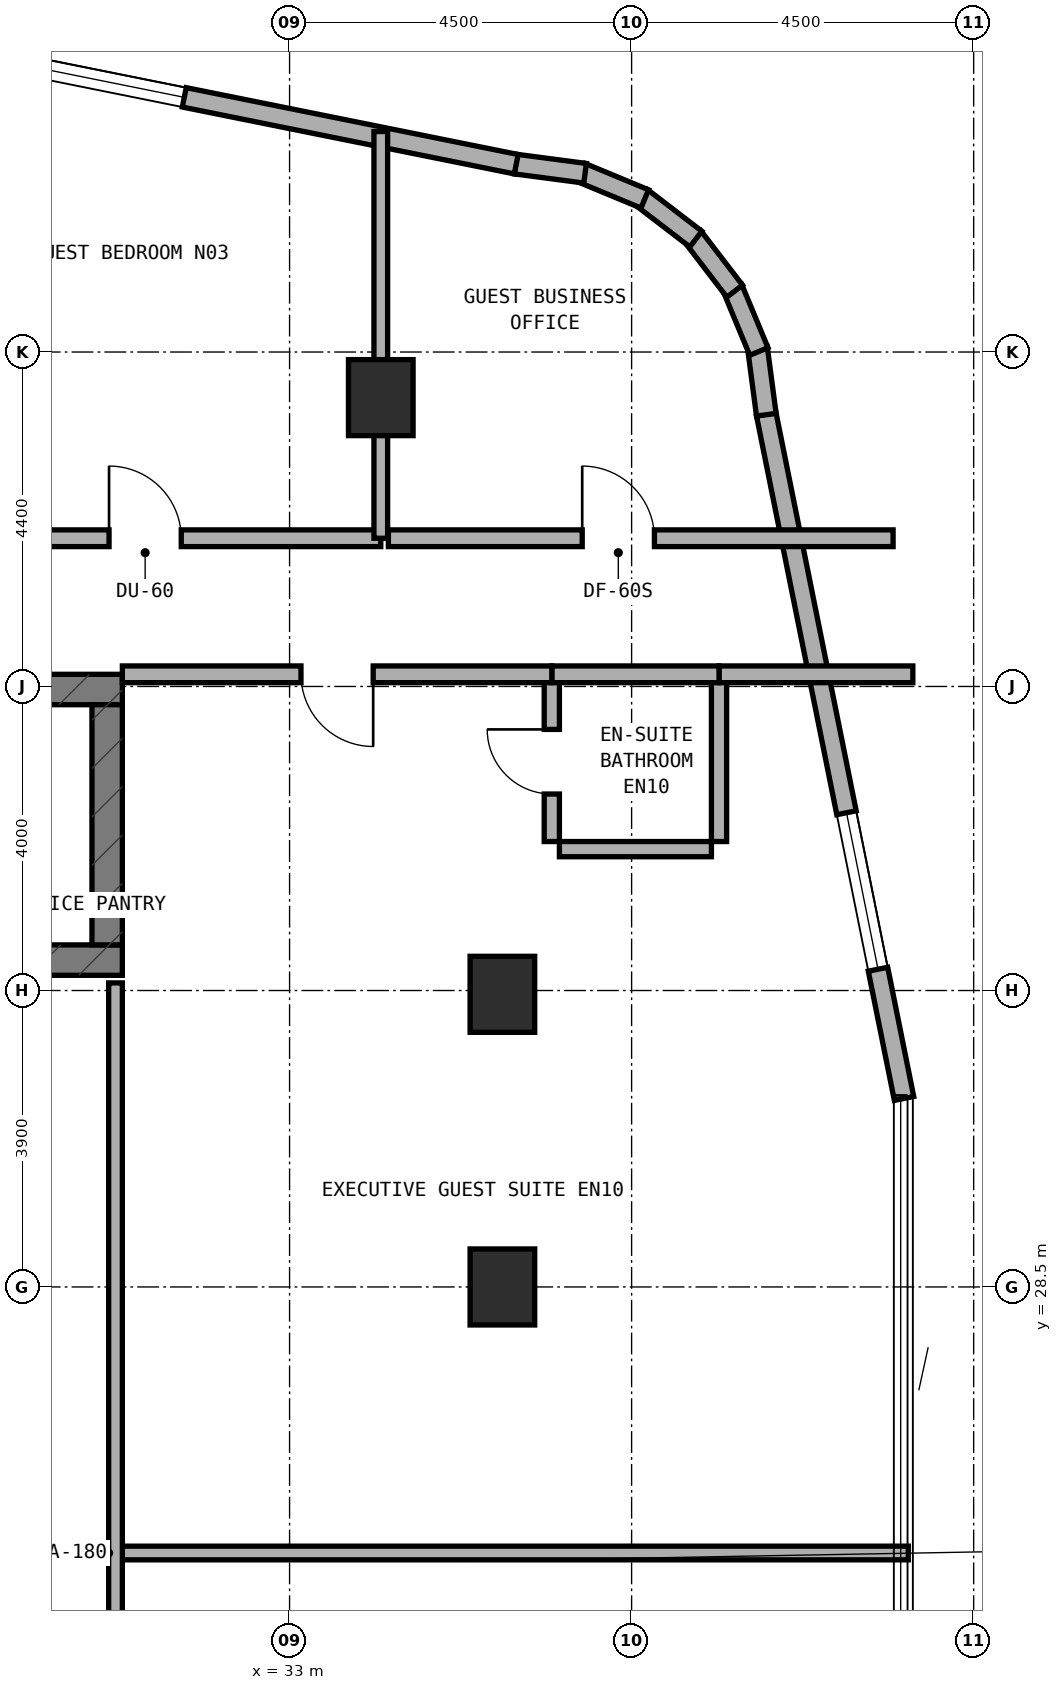
"""IFC4 building model, lengths in metres.
Left out: names, types, materials, properties, quantities, classifications, styles, units other than length and angle.
Written with IfcOpenShell. Run it as: python <this file> out.ifc"""

import sys

from ifc_helpers import new_model, si_unit, direction, frame, frame_2d, origin, origin_2d, place, context, subcontext, project, spatial, rectangle, extrude, element, fill, save


model = new_model("IFC4")
c1 = context("Model", 3, precision=1e-05, world=origin(), true_north=direction((0.0, 1.0)))
c2 = subcontext(c1, "Body", "Model", "MODEL_VIEW")
j1 = project(units=[si_unit("LENGTHUNIT", "METRE"), si_unit("PLANEANGLEUNIT", "RADIAN")], contexts=[c1])
p1 = place(None, origin())
s1 = spatial("IfcSite", under=j1, at=p1, CompositionType="ELEMENT")
p2 = place(p1, origin())
s2 = spatial("IfcBuilding", under=s1, at=p2, CompositionType="ELEMENT")
p3 = place(p2, frame((0.0, 0.0, 134.5)))
s3 = spatial("IfcBuildingStorey", under=s2, at=p3, CompositionType="ELEMENT", Elevation=134.5)
p4 = place(p3, frame((6.4, 32.8, 0.0), z_axis=(0.0, 0.0, 1.0), x_axis=(1.0, 0.0, 0.0)))
e1 = element("IfcWall", 1, at=p4, inside=s3, PredefinedType="SHEAR", context=c2, shape_type="SweptSolid", body=[
    extrude(rectangle(XDim=24.4, YDim=0.4, at=frame_2d((12.2, 0.0))), origin(), (0.0, 0.0, 1.0), 3.5),
])
p5 = place(p4, frame((6.05, 0.0, 0.0)))
e2 = element("IfcOpeningElement", 2, at=p5, cuts=e1, PredefinedType="OPENING", context=c2, shape_type="SweptSolid", body=[
    extrude(rectangle(XDim=1.1, YDim=2.15, at=frame_2d((0.55, 1.075))), frame((0.0, 0.21, 0.0), z_axis=(0.0, -1.0, 0.0), x_axis=(1.0, 0.0, 0.0)), (0.0, 0.0, 1.0), 0.42),
])
p6 = place(p3, frame((6.4, 36.36, 0.0), z_axis=(0.0, 0.0, 1.0), x_axis=(1.0, 0.0, 0.0)))
e3 = element("IfcWall", 3, at=p6, inside=s3, PredefinedType="SHEAR", context=c2, shape_type="SweptSolid", body=[
    extrude(rectangle(XDim=24.4, YDim=0.4, at=frame_2d((12.2, 0.0))), origin(), (0.0, 0.0, 1.0), 3.5),
])
p7 = place(p6, frame((9.15, 0.0, 0.0)))
e4 = element("IfcOpeningElement", 4, at=p7, cuts=e3, PredefinedType="OPENING", context=c2, shape_type="SweptSolid", body=[
    extrude(rectangle(XDim=1.2, YDim=2.15, at=frame_2d((0.6, 1.075))), frame((0.0, 0.21, 0.0), z_axis=(0.0, -1.0, 0.0), x_axis=(1.0, 0.0, 0.0)), (0.0, 0.0, 1.0), 0.42),
])
p8 = place(p6, frame((19.2, 0.0, 0.0)))
e5 = element("IfcOpeningElement", 5, at=p8, cuts=e3, PredefinedType="OPENING", context=c2, shape_type="SweptSolid", body=[
    extrude(rectangle(XDim=0.85, YDim=2.1, at=frame_2d((0.425, 1.05))), frame((0.0, 0.21, 0.0), z_axis=(0.0, -1.0, 0.0), x_axis=(1.0, 0.0, 0.0)), (0.0, 0.0, 1.0), 0.42),
])
p9 = place(p6, frame((16.94, 0.0, 0.0)))
e6 = element("IfcOpeningElement", 6, at=p9, cuts=e3, PredefinedType="OPENING", context=c2, shape_type="SweptSolid", body=[
    extrude(rectangle(XDim=0.85, YDim=2.1, at=frame_2d((0.425, 1.05))), frame((0.0, 0.21, 0.0), z_axis=(0.0, -1.0, 0.0), x_axis=(1.0, 0.0, 0.0)), (0.0, 0.0, 1.0), 0.42),
])
p10 = place(p3, frame((30.6, 33.0, 0.0), z_axis=(0.0, 0.0, 1.0), x_axis=(0.0, 1.0, 0.0)))
e7 = element("IfcWall", 7, at=p10, inside=s3, PredefinedType="SHEAR", context=c2, shape_type="SweptSolid", body=[
    extrude(rectangle(XDim=3.16, YDim=0.4, at=frame_2d((1.58, 0.0))), origin(), (0.0, 0.0, 1.0), 3.5),
])
for number, where, z_axis, x_axis in (
    (8, (34.2, 40.2, 0.0), (0.0, 0.0, 1.0), (1.0, 0.0, 0.0)),
    (9, (35.8, 28.5, 0.0), (0.0, 0.0, 1.0), (1.0, 0.0, 0.0)),
    (10, (35.8, 32.35, 0.0), (0.0, 0.0, 1.0), (1.0, 0.0, 0.0)),
):
    element("IfcColumn", number, at=place(p3, frame(where, z_axis=z_axis, x_axis=x_axis)), inside=s3, PredefinedType="COLUMN", context=c2, shape_type="SweptSolid", body=[
        extrude(rectangle(XDim=0.85, YDim=1.0, at=origin_2d()), origin(), (0.0, 0.0, 1.0), 3.5),
    ])
p11 = place(p3, frame((41.084, 30.98, 0.0), z_axis=(0.0, 0.0, 1.0), x_axis=(-0.197435082048, 0.980315963543, 0.0)))
e11 = element("IfcWall", 11, at=p11, inside=s3, PredefinedType="STANDARD", context=c2, shape_type="SweptSolid", body=[
    extrude(rectangle(XDim=9.183, YDim=0.26, at=frame_2d((4.591, 0.0))), origin(), (0.0, 0.0, 1.0), 3.22),
])
p12 = place(p11, frame((1.734, 0.0, 0.85)))
e12 = element("IfcOpeningElement", 12, at=p12, cuts=e11, PredefinedType="OPENING", context=c2, shape_type="SweptSolid", body=[
    extrude(rectangle(XDim=2.1, YDim=1.5, at=frame_2d((1.05, 0.75))), frame((0.0, 0.14, 0.0), z_axis=(0.0, -1.0, 0.0), x_axis=(1.0, 0.0, 0.0)), (0.0, 0.0, 1.0), 0.28),
])
p13 = place(p3, frame((39.272, 39.975, 0.0), z_axis=(0.0, 0.0, 1.0), x_axis=(-0.130953706898, 0.991388484223, 0.0)))
e13 = element("IfcWall", 13, at=p13, inside=s3, PredefinedType="STANDARD", context=c2, shape_type="SweptSolid", body=[
    extrude(rectangle(XDim=0.885, YDim=0.26, at=frame_2d((0.443, 0.0))), origin(), (0.0, 0.0, 1.0), 3.22),
])
p14 = place(p3, frame((39.174, 40.807, 0.0), z_axis=(0.0, 0.0, 1.0), x_axis=(-0.383290660547, 0.923627776508, 0.0)))
e14 = element("IfcWall", 14, at=p14, inside=s3, PredefinedType="STANDARD", context=c2, shape_type="SweptSolid", body=[
    extrude(rectangle(XDim=0.903, YDim=0.26, at=frame_2d((0.452, 0.0))), origin(), (0.0, 0.0, 1.0), 3.22),
])
p15 = place(p3, frame((38.856, 41.601, 0.0), z_axis=(0.0, 0.0, 1.0), x_axis=(-0.608624690463, 0.793458244748, 0.0)))
e15 = element("IfcWall", 15, at=p15, inside=s3, PredefinedType="STANDARD", context=c2, shape_type="SweptSolid", body=[
    extrude(rectangle(XDim=0.902, YDim=0.26, at=frame_2d((0.451, 0.0))), origin(), (0.0, 0.0, 1.0), 3.22),
])
p16 = place(p3, frame((38.345, 42.286, 0.0), z_axis=(0.0, 0.0, 1.0), x_axis=(-0.793558456666, 0.608494022858, 0.0)))
e16 = element("IfcWall", 16, at=p16, inside=s3, PredefinedType="STANDARD", context=c2, shape_type="SweptSolid", body=[
    extrude(rectangle(XDim=0.902, YDim=0.26, at=frame_2d((0.451, 0.0))), origin(), (0.0, 0.0, 1.0), 3.22),
])
p17 = place(p3, frame((37.673, 42.814, 0.0), z_axis=(0.0, 0.0, 1.0), x_axis=(-0.923683767999, 0.383155708213, 0.0)))
e17 = element("IfcWall", 17, at=p17, inside=s3, PredefinedType="STANDARD", context=c2, shape_type="SweptSolid", body=[
    extrude(rectangle(XDim=0.903, YDim=0.26, at=frame_2d((0.451, 0.0))), origin(), (0.0, 0.0, 1.0), 3.22),
])
p18 = place(p3, frame((36.888, 43.152, 0.0), z_axis=(0.0, 0.0, 1.0), x_axis=(-0.991487658083, 0.130200706103, 0.0)))
e18 = element("IfcWall", 18, at=p18, inside=s3, PredefinedType="STANDARD", context=c2, shape_type="SweptSolid", body=[
    extrude(rectangle(XDim=0.921, YDim=0.26, at=frame_2d((0.46, 0.0))), origin(), (0.0, 0.0, 1.0), 3.22),
])
p19 = place(p3, frame((35.982, 43.271, 0.0), z_axis=(0.0, 0.0, 1.0), x_axis=(-0.980317172899, 0.197429077186, 0.0)))
e19 = element("IfcWall", 19, at=p19, inside=s3, PredefinedType="STANDARD", context=c2, shape_type="SweptSolid", body=[
    extrude(rectangle(XDim=9.117, YDim=0.26, at=frame_2d((4.559, 0.0))), origin(), (0.0, 0.0, 1.0), 3.22),
])
p20 = place(p19, frame((4.455, 0.0, 0.85)))
e20 = element("IfcOpeningElement", 20, at=p20, cuts=e19, PredefinedType="OPENING", context=c2, shape_type="SweptSolid", body=[
    extrude(rectangle(XDim=2.1, YDim=1.5, at=frame_2d((1.05, 0.75))), frame((0.0, 0.14, 0.0), z_axis=(0.0, -1.0, 0.0), x_axis=(1.0, 0.0, 0.0)), (0.0, 0.0, 1.0), 0.28),
])
p21 = place(p3, frame((28.0, 38.35, 0.0), z_axis=(0.0, 0.0, 1.0), x_axis=(1.0, 0.0, 0.0)))
e21 = element("IfcWall", 21, at=p21, inside=s3, PredefinedType="SOLIDWALL", context=c2, shape_type="SweptSolid", body=[
    extrude(rectangle(XDim=6.2, YDim=0.22, at=frame_2d((3.1, 0.0))), origin(), (0.0, 0.0, 1.0), 2.695),
])
p22 = place(p21, frame((2.625, 0.0, 0.0)))
e22 = element("IfcOpeningElement", 22, at=p22, cuts=e21, PredefinedType="OPENING", context=c2, shape_type="SweptSolid", body=[
    extrude(rectangle(XDim=0.95, YDim=2.1, at=frame_2d((0.475, 1.05))), frame((0.0, 0.12, 0.0), z_axis=(0.0, -1.0, 0.0), x_axis=(1.0, 0.0, 0.0)), (0.0, 0.0, 1.0), 0.24),
])
p23 = place(p3, frame((34.2, 38.35, 0.0), z_axis=(0.0, 0.0, 1.0), x_axis=(0.0, 1.0, 0.0)))
e23 = element("IfcWall", 23, at=p23, inside=s3, PredefinedType="SOLIDWALL", context=c2, shape_type="SweptSolid", body=[
    extrude(rectangle(XDim=5.351, YDim=0.18, at=frame_2d((2.675, 0.0))), origin(), (0.0, 0.0, 1.0), 2.695),
])
p24 = place(p3, frame((34.3, 38.35, 0.0), z_axis=(0.0, 0.0, 1.0), x_axis=(1.0, 0.0, 0.0)))
e24 = element("IfcWall", 24, at=p24, inside=s3, PredefinedType="SOLIDWALL", context=c2, shape_type="SweptSolid", body=[
    extrude(rectangle(XDim=6.64, YDim=0.22, at=frame_2d((3.32, 0.0))), origin(), (0.0, 0.0, 1.0), 2.835),
])
p25 = place(p24, frame((2.55, 0.0, 0.0)))
e25 = element("IfcOpeningElement", 25, at=p25, cuts=e24, PredefinedType="OPENING", context=c2, shape_type="SweptSolid", body=[
    extrude(rectangle(XDim=0.95, YDim=2.1, at=frame_2d((0.475, 1.05))), frame((0.0, 0.12, 0.0), z_axis=(0.0, -1.0, 0.0), x_axis=(1.0, 0.0, 0.0)), (0.0, 0.0, 1.0), 0.24),
])
p26 = place(p3, frame((30.8, 25.0, 0.0), z_axis=(0.0, 0.0, 1.0), x_axis=(1.0, 0.0, 0.0)))
e26 = element("IfcWall", 26, at=p26, inside=s3, PredefinedType="SOLIDWALL", context=c2, shape_type="SweptSolid", body=[
    extrude(rectangle(XDim=10.34, YDim=0.18, at=frame_2d((5.17, 0.0))), origin(), (0.0, 0.0, 1.0), 2.835),
])
p27 = place(p3, frame((30.71, 17.5, 0.0), z_axis=(0.0, 0.0, 1.0), x_axis=(0.0, 1.0, 0.0)))
e27 = element("IfcWall", 27, at=p27, inside=s3, PredefinedType="SOLIDWALL", context=c2, shape_type="SweptSolid", body=[
    extrude(rectangle(XDim=15.0, YDim=0.18, at=frame_2d((7.5, 0.0))), origin(), (0.0, 0.0, 1.0), 2.695),
])
p28 = place(p3, frame((36.45, 34.36, 0.0), z_axis=(0.0, 0.0, 1.0), x_axis=(0.0, 1.0, 0.0)))
e28 = element("IfcWall", 28, at=p28, inside=s3, PredefinedType="PLUMBINGWALL", context=c2, shape_type="SweptSolid", body=[
    extrude(rectangle(XDim=2.1, YDim=0.2, at=frame_2d((1.05, 0.0))), origin(), (0.0, 0.0, 1.0), 3.22),
])
p29 = place(p28, frame((0.625, 0.0, 0.0)))
e29 = element("IfcOpeningElement", 29, at=p29, cuts=e28, PredefinedType="OPENING", context=c2, shape_type="SweptSolid", body=[
    extrude(rectangle(XDim=0.85, YDim=2.1, at=frame_2d((0.425, 1.05))), frame((0.0, 0.11, 0.0), z_axis=(0.0, -1.0, 0.0), x_axis=(1.0, 0.0, 0.0)), (0.0, 0.0, 1.0), 0.22),
])
p30 = place(p3, frame((36.55, 34.26, 0.0), z_axis=(0.0, 0.0, 1.0), x_axis=(1.0, 0.0, 0.0)))
e30 = element("IfcWall", 30, at=p30, inside=s3, PredefinedType="PLUMBINGWALL", context=c2, shape_type="SweptSolid", body=[
    extrude(rectangle(XDim=2.0, YDim=0.2, at=frame_2d((1.0, 0.0))), origin(), (0.0, 0.0, 1.0), 3.22),
])
p31 = place(p3, frame((38.65, 34.36, 0.0), z_axis=(0.0, 0.0, 1.0), x_axis=(0.0, 1.0, 0.0)))
e31 = element("IfcWall", 31, at=p31, inside=s3, PredefinedType="PLUMBINGWALL", context=c2, shape_type="SweptSolid", body=[
    extrude(rectangle(XDim=2.1, YDim=0.2, at=frame_2d((1.05, 0.0))), origin(), (0.0, 0.0, 1.0), 3.22),
])
p32 = place(p3, frame((38.65, 36.56, 0.0), z_axis=(0.0, 0.0, 1.0), x_axis=(1.0, 0.0, 0.0)))
e32 = element("IfcWall", 32, at=p32, inside=s3, PredefinedType="SOLIDWALL", context=c2, shape_type="SweptSolid", body=[
    extrude(rectangle(XDim=2.55, YDim=0.22, at=frame_2d((1.275, 0.0))), origin(), (0.0, 0.0, 1.0), 3.22),
])
p33 = place(p3, frame((36.45, 36.56, 0.0), z_axis=(0.0, 0.0, 1.0), x_axis=(1.0, 0.0, 0.0)))
e33 = element("IfcWall", 33, at=p33, inside=s3, PredefinedType="SOLIDWALL", context=c2, shape_type="SweptSolid", body=[
    extrude(rectangle(XDim=2.2, YDim=0.22, at=frame_2d((1.1, 0.0))), origin(), (0.0, 0.0, 1.0), 3.22),
])
p34 = place(p3, frame((30.8, 36.56, 0.0), z_axis=(0.0, 0.0, 1.0), x_axis=(1.0, 0.0, 0.0)))
e34 = element("IfcWall", 34, at=p34, inside=s3, PredefinedType="SOLIDWALL", context=c2, shape_type="SweptSolid", body=[
    extrude(rectangle(XDim=5.65, YDim=0.22, at=frame_2d((2.825, 0.0))), origin(), (0.0, 0.0, 1.0), 2.695),
])
p35 = place(p34, frame((2.35, 0.0, 0.0)))
e35 = element("IfcOpeningElement", 35, at=p35, cuts=e34, PredefinedType="OPENING", context=c2, shape_type="SweptSolid", body=[
    extrude(rectangle(XDim=0.95, YDim=2.1, at=frame_2d((0.475, 1.05))), frame((0.0, 0.12, 0.0), z_axis=(0.0, -1.0, 0.0), x_axis=(1.0, 0.0, 0.0)), (0.0, 0.0, 1.0), 0.24),
])
p36 = place(p12, origin())
e36 = element("IfcWindow", 36, at=p36, inside=s3, PartitioningType="SINGLE_PANEL", PredefinedType="WINDOW", context=c2, shape_type="SweptSolid", body=[
    extrude(rectangle(XDim=2.1, YDim=1.5, at=frame_2d((1.05, 0.75))), frame((0.0, 0.03, 0.0), z_axis=(0.0, -1.0, 0.0), x_axis=(1.0, 0.0, 0.0)), (0.0, 0.0, 1.0), 0.06),
])
fill(e12, e36)
p37 = place(p20, origin())
e37 = element("IfcWindow", 37, at=p37, inside=s3, PartitioningType="SINGLE_PANEL", PredefinedType="WINDOW", context=c2, shape_type="SweptSolid", body=[
    extrude(rectangle(XDim=2.1, YDim=1.5, at=frame_2d((1.05, 0.75))), frame((0.0, 0.03, 0.0), z_axis=(0.0, -1.0, 0.0), x_axis=(1.0, 0.0, 0.0)), (0.0, 0.0, 1.0), 0.06),
])
fill(e20, e37)
p38 = place(p22, origin())
e38 = element("IfcDoor", 38, at=p38, inside=s3, OperationType="SINGLE_SWING_LEFT", PredefinedType="DOOR", context=c2, shape_type="SweptSolid", body=[
    extrude(rectangle(XDim=0.95, YDim=2.1, at=frame_2d((0.475, 1.05))), frame((0.0, 0.025, 0.0), z_axis=(0.0, -1.0, 0.0), x_axis=(1.0, 0.0, 0.0)), (0.0, 0.0, 1.0), 0.05),
])
fill(e22, e38)
p39 = place(p25, origin())
e39 = element("IfcDoor", 39, at=p39, inside=s3, OperationType="SINGLE_SWING_LEFT", PredefinedType="DOOR", context=c2, shape_type="SweptSolid", body=[
    extrude(rectangle(XDim=0.95, YDim=2.1, at=frame_2d((0.475, 1.05))), frame((0.0, 0.025, 0.0), z_axis=(0.0, -1.0, 0.0), x_axis=(1.0, 0.0, 0.0)), (0.0, 0.0, 1.0), 0.05),
])
fill(e25, e39)
p40 = place(p29, origin())
e40 = element("IfcDoor", 40, at=p40, inside=s3, OperationType="SINGLE_SWING_RIGHT", PredefinedType="DOOR", context=c2, shape_type="SweptSolid", body=[
    extrude(rectangle(XDim=0.85, YDim=2.1, at=frame_2d((0.425, 1.05))), frame((0.0, 0.025, 0.0), z_axis=(0.0, -1.0, 0.0), x_axis=(1.0, 0.0, 0.0)), (0.0, 0.0, 1.0), 0.05),
])
fill(e29, e40)
p41 = place(p35, frame((0.95, 0.0, 0.0), z_axis=(0.0, 0.0, 1.0), x_axis=(-1.0, 0.0, 0.0)))
e41 = element("IfcDoor", 41, at=p41, inside=s3, OperationType="SINGLE_SWING_LEFT", PredefinedType="DOOR", context=c2, shape_type="SweptSolid", body=[
    extrude(rectangle(XDim=0.95, YDim=2.1, at=frame_2d((0.475, 1.05))), frame((0.0, 0.025, 0.0), z_axis=(0.0, -1.0, 0.0), x_axis=(1.0, 0.0, 0.0)), (0.0, 0.0, 1.0), 0.05),
])
fill(e35, e41)
save(model, sys.argv[1])
